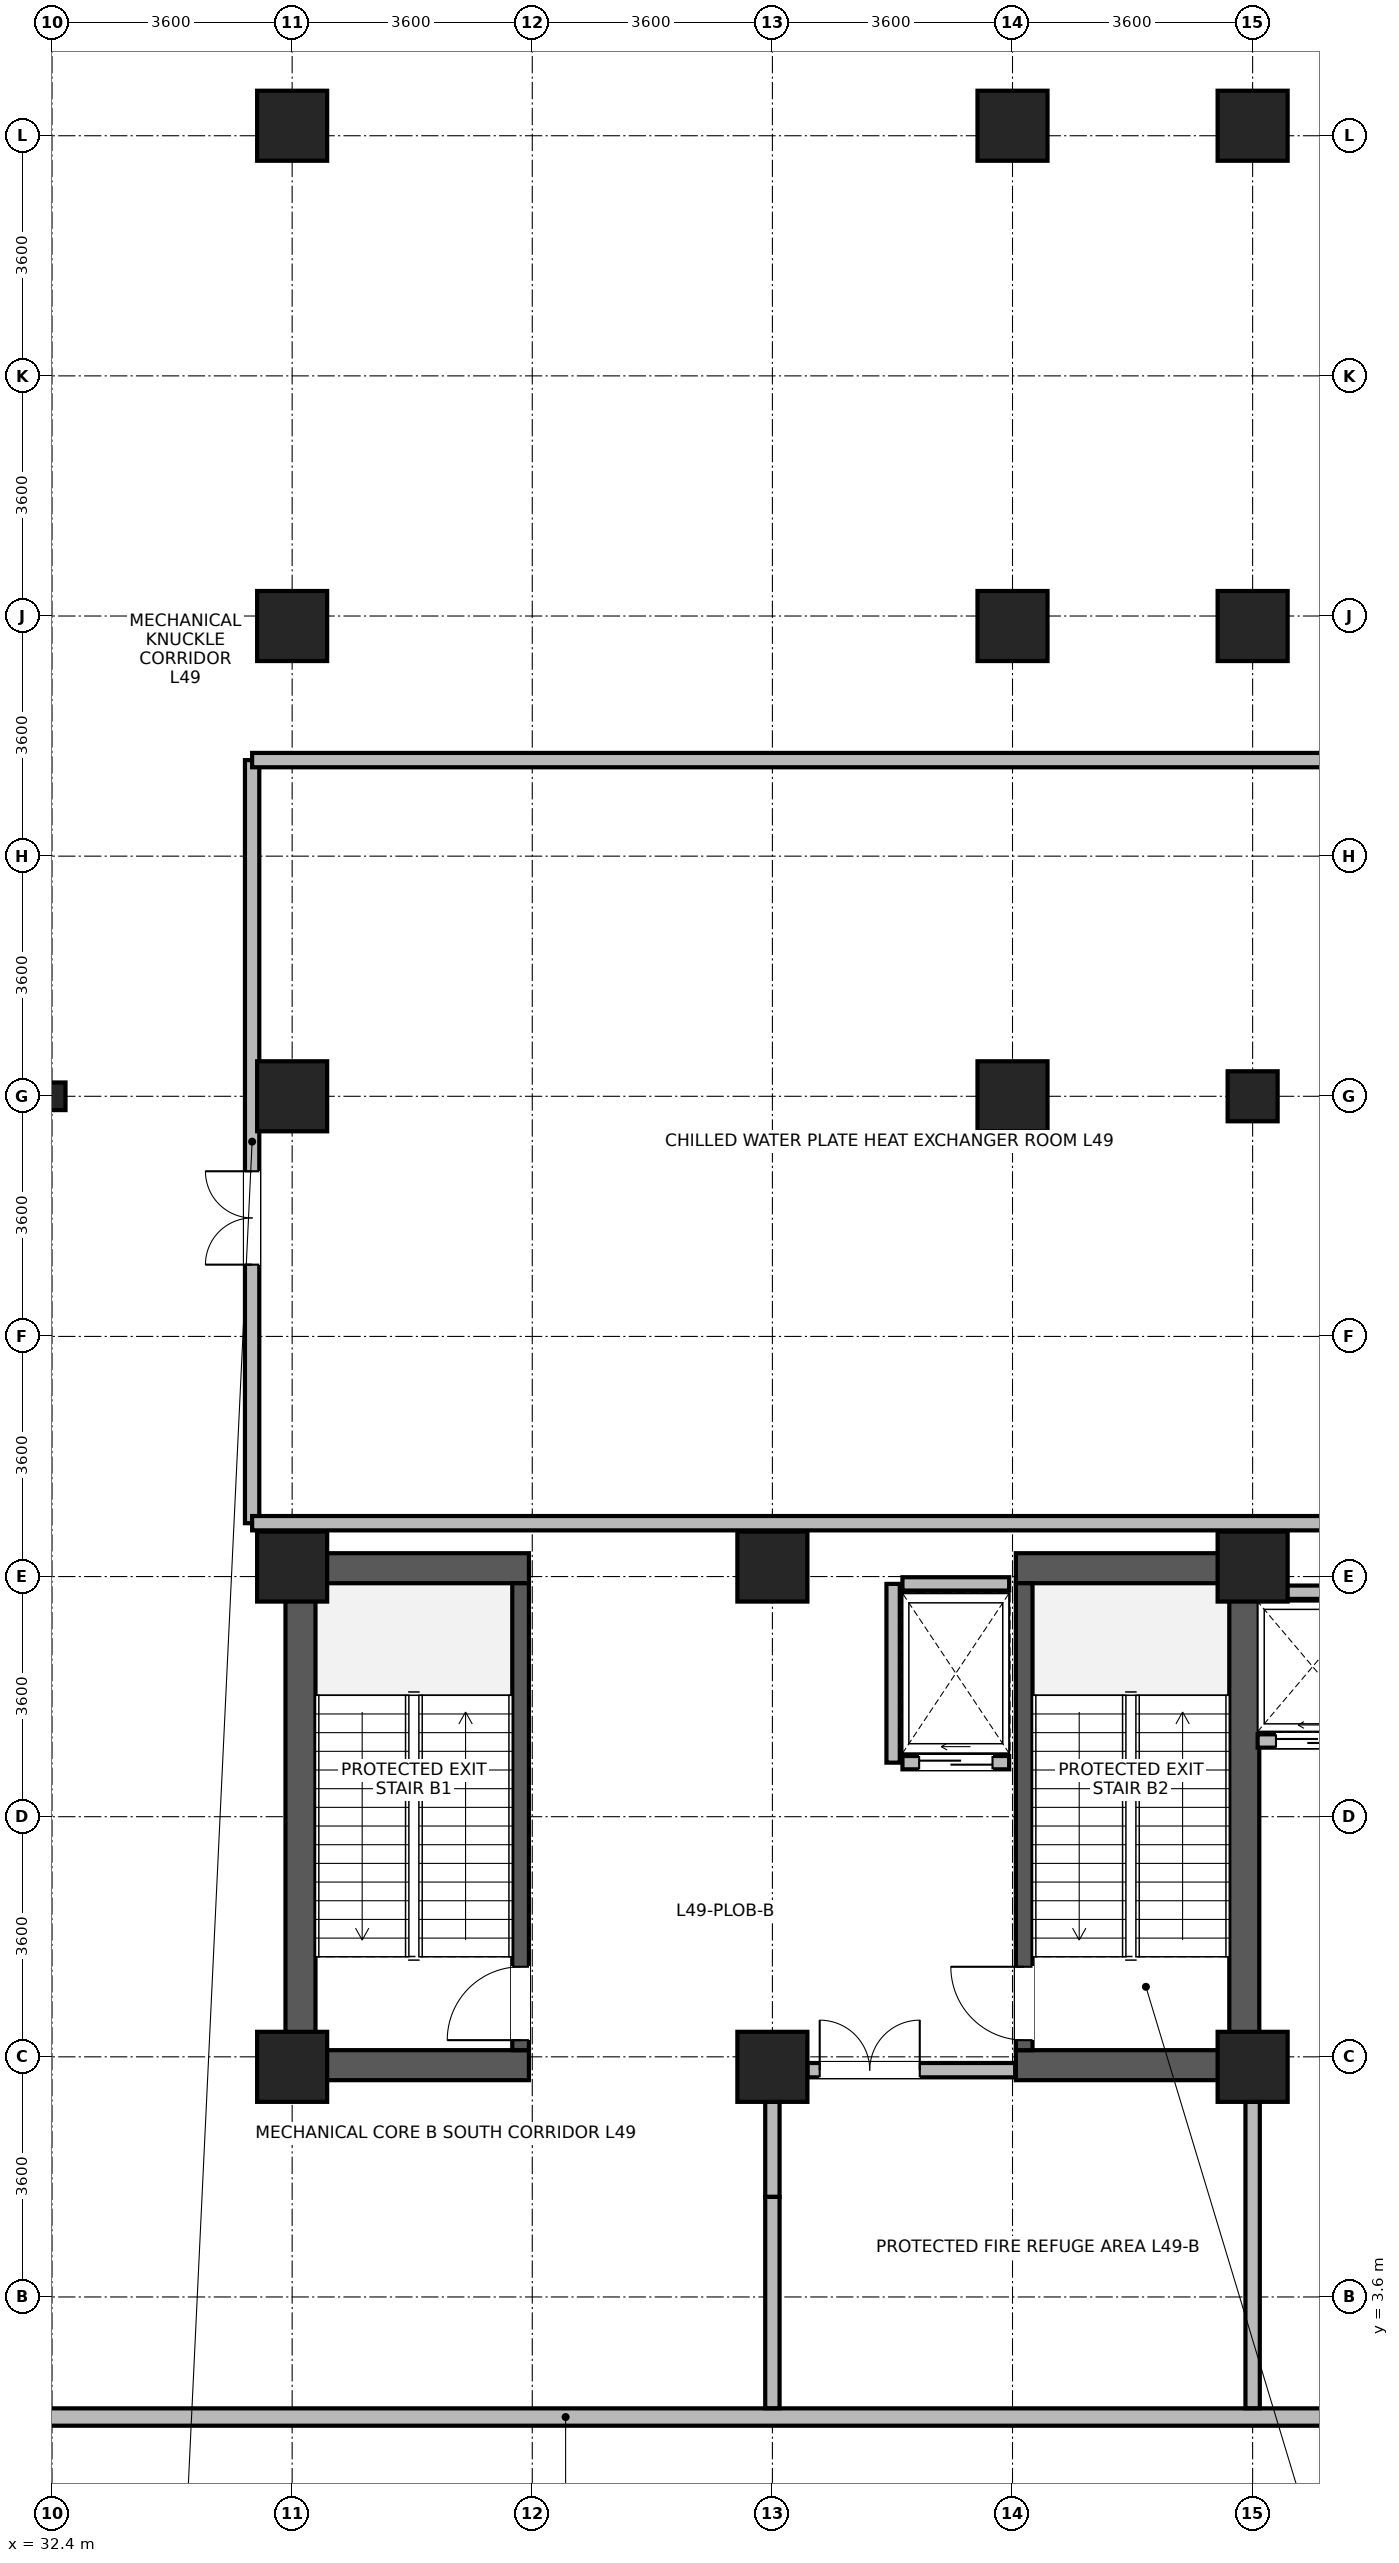
"""IFC4 building model, lengths in metres.
Left out: names, types, materials, properties, quantities, classifications, styles, units other than length and angle.
Written with IfcOpenShell. Run it as: python <this file> out.ifc"""

import sys

from ifc_helpers import new_model, si_unit, direction, frame, frame_2d, origin, origin_2d, place, context, subcontext, project, spatial, rectangle, i_section, extrude, source, transform, mapped, element, fill, save


model = new_model("IFC4")
c1 = context("Model", 3, precision=1e-05, world=origin(), true_north=direction((0.0, 1.0)))
c2 = subcontext(c1, "Body", "Model", "MODEL_VIEW")
j1 = project(units=[si_unit("LENGTHUNIT", "METRE"), si_unit("PLANEANGLEUNIT", "RADIAN")], contexts=[c1])
p1 = place(None, origin())
s1 = spatial("IfcSite", under=j1, at=p1, CompositionType="ELEMENT")
p2 = place(p1, origin())
s2 = spatial("IfcBuilding", under=s1, at=p2, CompositionType="ELEMENT")
p3 = place(p2, frame((0.0, 0.0, 192.0)))
s3 = spatial("IfcBuildingStorey", under=s2, at=p3, CompositionType="ELEMENT", Elevation=192.0)
for number, where, z_axis, x_axis in (
    (1, (36.125, 6.85, 0.0), (0.0, 0.0, 1.0), (0.0, 1.0, 0.0)),
    (2, (50.275, 6.85, 0.0), (0.0, 0.0, 1.0), (0.0, 1.0, 0.0)),
):
    element("IfcWall", number, at=place(p3, frame(where, z_axis=z_axis, x_axis=x_axis)), inside=s3, PredefinedType="SHEAR", context=c2, shape_type="SweptSolid", body=[
        extrude(rectangle(XDim=7.9, YDim=0.45, at=frame_2d((3.95, 0.0))), origin(), (0.0, 0.0, 1.0), 4.78),
    ])
for number, where, z_axis, x_axis in (
    (3, (36.35, 7.075, 0.0), (0.0, 0.0, 1.0), (1.0, 0.0, 0.0)),
    (4, (46.85, 7.075, 0.0), (0.0, 0.0, 1.0), (1.0, 0.0, 0.0)),
    (5, (36.35, 14.525, 0.0), (0.0, 0.0, 1.0), (1.0, 0.0, 0.0)),
    (6, (46.85, 14.525, 0.0), (0.0, 0.0, 1.0), (1.0, 0.0, 0.0)),
):
    element("IfcWall", number, at=place(p3, frame(where, z_axis=z_axis, x_axis=x_axis)), inside=s3, PredefinedType="SHEAR", context=c2, shape_type="SweptSolid", body=[
        extrude(rectangle(XDim=3.2, YDim=0.45, at=frame_2d((1.6, 0.0))), origin(), (0.0, 0.0, 1.0), 4.78),
    ])
p4 = place(p3, frame((39.425, 7.3, 0.0), z_axis=(0.0, 0.0, 1.0), x_axis=(0.0, 1.0, 0.0)))
e7 = element("IfcWall", 7, at=p4, inside=s3, PredefinedType="SHEAR", context=c2, shape_type="SweptSolid", body=[
    extrude(rectangle(XDim=7.0, YDim=0.25, at=frame_2d((3.5, 0.0))), origin(), (0.0, 0.0, 1.0), 4.78),
])
p5 = place(p4, frame((0.15, 0.0, 0.0)))
e8 = element("IfcOpeningElement", 8, at=p5, cuts=e7, PredefinedType="OPENING", context=c2, shape_type="SweptSolid", body=[
    extrude(rectangle(XDim=1.1, YDim=2.08, at=frame_2d((0.55, 1.04))), frame((0.0, 0.135, 0.0), z_axis=(0.0, -1.0, 0.0), x_axis=(1.0, 0.0, 0.0)), (0.0, 0.0, 1.0), 0.27),
])
p6 = place(p3, frame((46.975, 7.3, 0.0), z_axis=(0.0, 0.0, 1.0), x_axis=(0.0, 1.0, 0.0)))
e9 = element("IfcWall", 9, at=p6, inside=s3, PredefinedType="SHEAR", context=c2, shape_type="SweptSolid", body=[
    extrude(rectangle(XDim=7.0, YDim=0.25, at=frame_2d((3.5, 0.0))), origin(), (0.0, 0.0, 1.0), 4.78),
])
p7 = place(p6, frame((0.15, 0.0, 0.0)))
e10 = element("IfcOpeningElement", 10, at=p7, cuts=e9, PredefinedType="OPENING", context=c2, shape_type="SweptSolid", body=[
    extrude(rectangle(XDim=1.1, YDim=2.08, at=frame_2d((0.55, 1.04))), frame((0.0, 0.135, 0.0), z_axis=(0.0, -1.0, 0.0), x_axis=(1.0, 0.0, 0.0)), (0.0, 0.0, 1.0), 0.27),
])
m1 = source(origin(), c2, "Body", "SweptSolid", [
    extrude(rectangle(XDim=1.05, YDim=1.05, at=origin_2d()), origin(), (0.0, 0.0, 1.0), 5.2),
])
for number, where, z_axis, x_axis in (
    (11, (36.0, 21.6, 0.0), (0.0, 0.0, 1.0), (1.0, 0.0, 0.0)),
    (12, (36.0, 28.65, 0.0), (0.0, 0.0, 1.0), (1.0, 0.0, 0.0)),
    (13, (36.0, 36.15, 0.0), (0.0, 0.0, 1.0), (1.0, 0.0, 0.0)),
    (14, (46.8, 21.6, 0.0), (0.0, 0.0, 1.0), (1.0, 0.0, 0.0)),
    (15, (46.8, 28.65, 0.0), (0.0, 0.0, 1.0), (1.0, 0.0, 0.0)),
    (16, (46.8, 36.15, 0.0), (0.0, 0.0, 1.0), (1.0, 0.0, 0.0)),
    (17, (36.0, 7.05, 0.0), (0.0, 0.0, 1.0), (1.0, 0.0, 0.0)),
    (18, (36.0, 14.55, 0.0), (0.0, 0.0, 1.0), (1.0, 0.0, 0.0)),
    (19, (43.2, 7.05, 0.0), (0.0, 0.0, 1.0), (1.0, 0.0, 0.0)),
    (20, (43.2, 14.55, 0.0), (0.0, 0.0, 1.0), (1.0, 0.0, 0.0)),
    (21, (50.4, 7.05, 0.0), (0.0, 0.0, 1.0), (1.0, 0.0, 0.0)),
    (22, (50.4, 14.55, 0.0), (0.0, 0.0, 1.0), (1.0, 0.0, 0.0)),
):
    element("IfcColumn", number, at=place(p3, frame(where, z_axis=z_axis, x_axis=x_axis)), inside=s3, PredefinedType="COLUMN", context=c2, shape_type="MappedRepresentation", body=[
        mapped(m1, transform((0.0, 0.0, 0.0), x_axis=(1.0, 0.0, 0.0), y_axis=(0.0, 1.0, 0.0), z_axis=(0.0, 0.0, 1.0), scale=1.0)),
    ])
m2 = source(origin(), c2, "Body", "SweptSolid", [
    extrude(rectangle(XDim=0.75, YDim=0.75, at=origin_2d()), origin(), (0.0, 0.0, 1.0), 5.2),
])
p8 = place(p3, frame((50.4, 21.6, 0.0), z_axis=(0.0, 0.0, 1.0), x_axis=(1.0, 0.0, 0.0)))
e23 = element("IfcColumn", 23, at=p8, inside=s3, PredefinedType="PILASTER", context=c2, shape_type="MappedRepresentation", body=[
    mapped(m2, transform((0.0, 0.0, 0.0), x_axis=(1.0, 0.0, 0.0), y_axis=(0.0, 1.0, 0.0), z_axis=(0.0, 0.0, 1.0), scale=1.0)),
])
for number, where, z_axis, x_axis in (
    (24, (50.4, 28.65, 0.0), (0.0, 0.0, 1.0), (1.0, 0.0, 0.0)),
    (25, (50.4, 36.15, 0.0), (0.0, 0.0, 1.0), (1.0, 0.0, 0.0)),
):
    element("IfcColumn", number, at=place(p3, frame(where, z_axis=z_axis, x_axis=x_axis)), inside=s3, PredefinedType="COLUMN", context=c2, shape_type="MappedRepresentation", body=[
        mapped(m1, transform((0.0, 0.0, 0.0), x_axis=(1.0, 0.0, 0.0), y_axis=(0.0, 1.0, 0.0), z_axis=(0.0, 0.0, 1.0), scale=1.0)),
    ])
m3 = source(origin(), c2, "Body", "SweptSolid", [
    extrude(i_section(OverallWidth=0.404, OverallDepth=0.414, WebThickness=0.021, FlangeThickness=0.028, FilletRadius=0.015, at=origin_2d()), origin(), (0.0, 0.0, 1.0), 5.2),
])
p9 = place(p3, frame((32.4, 21.6, 0.0), z_axis=(0.0, 0.0, 1.0), x_axis=(1.0, 0.0, 0.0)))
e26 = element("IfcColumn", 26, at=p9, inside=s3, PredefinedType="COLUMN", context=c2, shape_type="MappedRepresentation", body=[
    mapped(m3, transform((0.0, 0.0, 0.0), x_axis=(1.0, 0.0, 0.0), y_axis=(0.0, 1.0, 0.0), z_axis=(0.0, 0.0, 1.0), scale=1.0)),
])
p10 = place(p3, frame((54.365, 1.8, 0.0), z_axis=(0.0, 0.0, 1.0), x_axis=(-1.0, 0.0, 0.0)))
e27 = element("IfcWall", 27, at=p10, inside=s3, PredefinedType="STANDARD", context=c2, shape_type="SweptSolid", body=[
    extrude(rectangle(XDim=28.53, YDim=0.26, at=frame_2d((14.265, 0.0))), origin(), (0.0, 0.0, 1.0), 4.76),
])
p11 = place(p3, frame((50.475, 11.935, 0.0), z_axis=(0.0, 0.0, 1.0), x_axis=(1.0, 0.0, 0.0)))
e28 = element("IfcWall", 28, at=p11, inside=s3, PredefinedType="PARTITIONING", context=c2, shape_type="SweptSolid", body=[
    extrude(rectangle(XDim=1.65, YDim=0.2, at=frame_2d((0.825, 0.0))), origin(), (0.0, 0.0, 1.0), 4.76),
])
p12 = place(p11, frame((0.275, 0.0, 0.0)))
e29 = element("IfcOpeningElement", 29, at=p12, cuts=e28, PredefinedType="OPENING", context=c2, shape_type="SweptSolid", body=[
    extrude(rectangle(XDim=1.1, YDim=2.12, at=frame_2d((0.55, 1.06))), frame((0.0, 0.11, 0.0), z_axis=(0.0, -1.0, 0.0), x_axis=(1.0, 0.0, 0.0)), (0.0, 0.0, 1.0), 0.22),
])
p13 = place(p3, frame((50.475, 14.165, 0.0), z_axis=(0.0, 0.0, 1.0), x_axis=(1.0, 0.0, 0.0)))
e30 = element("IfcWall", 30, at=p13, inside=s3, PredefinedType="PARTITIONING", context=c2, shape_type="SweptSolid", body=[
    extrude(rectangle(XDim=1.65, YDim=0.2, at=frame_2d((0.825, 0.0))), origin(), (0.0, 0.0, 1.0), 4.76),
])
p14 = place(p3, frame((45.15, 11.61, 0.0), z_axis=(0.0, 0.0, 1.0), x_axis=(1.0, 0.0, 0.0)))
e31 = element("IfcWall", 31, at=p14, inside=s3, PredefinedType="PARTITIONING", context=c2, shape_type="SweptSolid", body=[
    extrude(rectangle(XDim=1.6, YDim=0.2, at=frame_2d((0.8, 0.0))), origin(), (0.0, 0.0, 1.0), 4.76),
])
p15 = place(p14, frame((0.25, 0.0, 0.0)))
e32 = element("IfcOpeningElement", 32, at=p15, cuts=e31, PredefinedType="OPENING", context=c2, shape_type="SweptSolid", body=[
    extrude(rectangle(XDim=1.1, YDim=2.12, at=frame_2d((0.55, 1.06))), frame((0.0, 0.11, 0.0), z_axis=(0.0, -1.0, 0.0), x_axis=(1.0, 0.0, 0.0)), (0.0, 0.0, 1.0), 0.22),
])
p16 = place(p3, frame((45.15, 14.29, 0.0), z_axis=(0.0, 0.0, 1.0), x_axis=(1.0, 0.0, 0.0)))
e33 = element("IfcWall", 33, at=p16, inside=s3, PredefinedType="PARTITIONING", context=c2, shape_type="SweptSolid", body=[
    extrude(rectangle(XDim=1.6, YDim=0.2, at=frame_2d((0.8, 0.0))), origin(), (0.0, 0.0, 1.0), 3.76),
])
p17 = place(p3, frame((45.01, 11.61, 0.0), z_axis=(0.0, 0.0, 1.0), x_axis=(0.0, 1.0, 0.0)))
e34 = element("IfcWall", 34, at=p17, inside=s3, PredefinedType="PARTITIONING", context=c2, shape_type="SweptSolid", body=[
    extrude(rectangle(XDim=2.68, YDim=0.2, at=frame_2d((1.34, 0.0))), origin(), (0.0, 0.0, 1.0), 4.76),
])
p18 = place(p3, frame((43.725, 7.0, 0.0), z_axis=(0.0, 0.0, 1.0), x_axis=(1.0, 0.0, 0.0)))
e35 = element("IfcWall", 35, at=p18, inside=s3, PredefinedType="PARTITIONING", context=c2, shape_type="SweptSolid", body=[
    extrude(rectangle(XDim=3.115, YDim=0.215, at=frame_2d((1.558, 0.0))), origin(), (0.0, 0.0, 1.0), 3.76),
])
p19 = place(p18, frame((0.185, 0.0, 0.0)))
e36 = element("IfcOpeningElement", 36, at=p19, cuts=e35, PredefinedType="OPENING", context=c2, shape_type="SweptSolid", body=[
    extrude(rectangle(XDim=1.5, YDim=2.1, at=frame_2d((0.75, 1.05))), frame((0.0, 0.118, 0.0), z_axis=(0.0, -1.0, 0.0), x_axis=(1.0, 0.0, 0.0)), (0.0, 0.0, 1.0), 0.235),
])
p20 = place(p3, frame((35.4, 15.2, 0.0), z_axis=(0.0, 0.0, 1.0), x_axis=(0.0, 1.0, 0.0)))
e37 = element("IfcWall", 37, at=p20, inside=s3, PredefinedType="PARTITIONING", context=c2, shape_type="SweptSolid", body=[
    extrude(rectangle(XDim=11.44, YDim=0.215, at=frame_2d((5.72, 0.0))), origin(), (0.0, 0.0, 1.0), 4.76),
])
p21 = place(p20, frame((3.876, 0.0, 0.0)))
e38 = element("IfcOpeningElement", 38, at=p21, cuts=e37, PredefinedType="OPENING", context=c2, shape_type="SweptSolid", body=[
    extrude(rectangle(XDim=1.4, YDim=2.15, at=frame_2d((0.7, 1.075))), frame((0.0, 0.118, 0.0), z_axis=(0.0, -1.0, 0.0), x_axis=(1.0, 0.0, 0.0)), (0.0, 0.0, 1.0), 0.235),
])
p22 = place(p3, frame((43.2, 5.1, 0.0), z_axis=(0.0, 0.0, 1.0), x_axis=(0.0, 1.0, 0.0)))
e39 = element("IfcWall", 39, at=p22, inside=s3, PredefinedType="PARTITIONING", context=c2, shape_type="SweptSolid", body=[
    extrude(rectangle(XDim=1.425, YDim=0.215, at=frame_2d((0.712, 0.0))), origin(), (0.0, 0.0, 1.0), 4.76),
])
for number, where, z_axis, x_axis in (
    (40, (35.4, 15.2, 0.0), (0.0, 0.0, 1.0), (1.0, 0.0, 0.0)),
    (41, (35.4, 26.64, 0.0), (0.0, 0.0, 1.0), (1.0, 0.0, 0.0)),
):
    element("IfcWall", number, at=place(p3, frame(where, z_axis=z_axis, x_axis=x_axis)), inside=s3, PredefinedType="PARTITIONING", context=c2, shape_type="SweptSolid", body=[
        extrude(rectangle(XDim=18.968, YDim=0.215, at=frame_2d((9.484, 0.0))), origin(), (0.0, 0.0, 1.0), 4.76),
    ])
p23 = place(p3, frame((50.4, 1.932, 0.0), z_axis=(0.0, 0.0, 1.0), x_axis=(0.0, 1.0, 0.0)))
e42 = element("IfcWall", 42, at=p23, inside=s3, PredefinedType="PARTITIONING", context=c2, shape_type="SweptSolid", body=[
    extrude(rectangle(XDim=4.593, YDim=0.215, at=frame_2d((2.296, 0.0))), origin(), (0.0, 0.0, 1.0), 4.76),
])
p24 = place(p3, frame((43.2, 1.932, 0.0), z_axis=(0.0, 0.0, 1.0), x_axis=(0.0, 1.0, 0.0)))
e43 = element("IfcWall", 43, at=p24, inside=s3, PredefinedType="PARTITIONING", context=c2, shape_type="SweptSolid", body=[
    extrude(rectangle(XDim=3.168, YDim=0.215, at=frame_2d((1.584, 0.0))), origin(), (0.0, 0.0, 1.0), 4.76),
])
p25 = place(p5, origin())
e44 = element("IfcDoor", 44, at=p25, inside=s3, OperationType="SINGLE_SWING_LEFT", PredefinedType="DOOR", context=c2, shape_type="SweptSolid", body=[
    extrude(rectangle(XDim=1.1, YDim=2.08, at=frame_2d((0.55, 1.04))), frame((0.0, 0.025, 0.0), z_axis=(0.0, -1.0, 0.0), x_axis=(1.0, 0.0, 0.0)), (0.0, 0.0, 1.0), 0.05),
])
fill(e8, e44)
p26 = place(p7, origin())
e45 = element("IfcDoor", 45, at=p26, inside=s3, OperationType="SINGLE_SWING_RIGHT", PredefinedType="DOOR", context=c2, shape_type="SweptSolid", body=[
    extrude(rectangle(XDim=1.1, YDim=2.08, at=frame_2d((0.55, 1.04))), frame((0.0, 0.025, 0.0), z_axis=(0.0, -1.0, 0.0), x_axis=(1.0, 0.0, 0.0)), (0.0, 0.0, 1.0), 0.05),
])
fill(e10, e45)
p27 = place(p12, origin())
e46 = element("IfcDoor", 46, at=p27, inside=s3, OperationType="SLIDING_TO_LEFT", PredefinedType="DOOR", context=c2, shape_type="SweptSolid", body=[
    extrude(rectangle(XDim=1.1, YDim=2.12, at=frame_2d((0.55, 1.06))), frame((0.0, 0.025, 0.0), z_axis=(0.0, -1.0, 0.0), x_axis=(1.0, 0.0, 0.0)), (0.0, 0.0, 1.0), 0.05),
])
fill(e29, e46)
p28 = place(p15, origin())
e47 = element("IfcDoor", 47, at=p28, inside=s3, OperationType="SLIDING_TO_LEFT", PredefinedType="DOOR", context=c2, shape_type="SweptSolid", body=[
    extrude(rectangle(XDim=1.1, YDim=2.12, at=frame_2d((0.55, 1.06))), frame((0.0, 0.025, 0.0), z_axis=(0.0, -1.0, 0.0), x_axis=(1.0, 0.0, 0.0)), (0.0, 0.0, 1.0), 0.05),
])
fill(e32, e47)
p29 = place(p19, origin())
e48 = element("IfcDoor", 48, at=p29, inside=s3, OperationType="DOUBLE_DOOR_SINGLE_SWING", PredefinedType="DOOR", context=c2, shape_type="SweptSolid", body=[
    extrude(rectangle(XDim=1.5, YDim=2.1, at=frame_2d((0.75, 1.05))), frame((0.0, 0.025, 0.0), z_axis=(0.0, -1.0, 0.0), x_axis=(1.0, 0.0, 0.0)), (0.0, 0.0, 1.0), 0.05),
])
fill(e36, e48)
p30 = place(p21, origin())
e49 = element("IfcDoor", 49, at=p30, inside=s3, OperationType="DOUBLE_DOOR_SINGLE_SWING", PredefinedType="DOOR", context=c2, shape_type="SweptSolid", body=[
    extrude(rectangle(XDim=1.4, YDim=2.15, at=frame_2d((0.7, 1.075))), frame((0.0, 0.025, 0.0), z_axis=(0.0, -1.0, 0.0), x_axis=(1.0, 0.0, 0.0)), (0.0, 0.0, 1.0), 0.05),
])
fill(e38, e49)
save(model, sys.argv[1])
